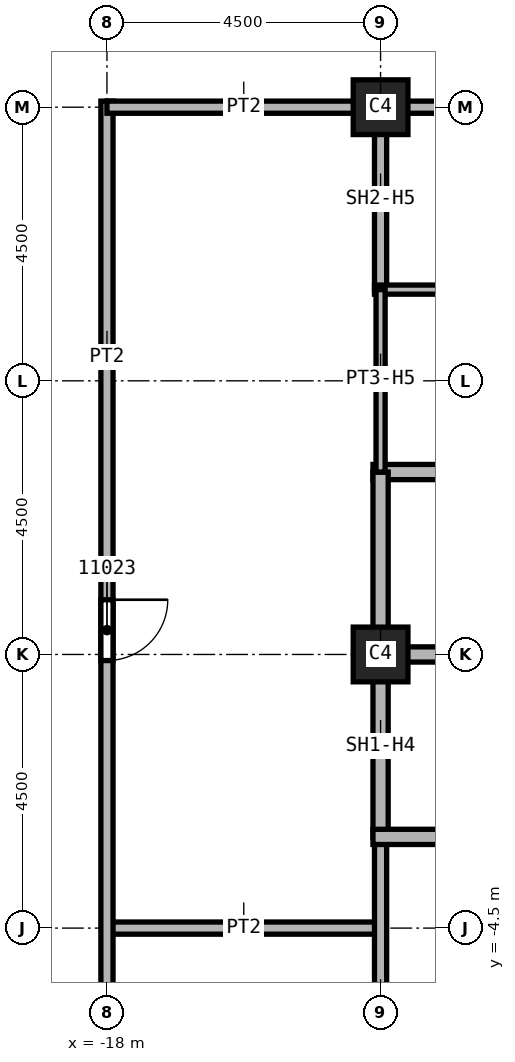
"""IFC4 building model, lengths in metres.
Left out: names, types, materials, properties, quantities, classifications, styles, units other than length and angle.
Written with IfcOpenShell. Run it as: python <this file> out.ifc"""

import sys

from ifc_helpers import new_model, si_unit, direction, frame, frame_2d, origin, origin_2d, place, context, subcontext, project, spatial, rectangle, extrude, element, fill, save


model = new_model("IFC4")
c1 = context("Model", 3, precision=1e-05, world=origin(), true_north=direction((0.0, 1.0)))
c2 = subcontext(c1, "Body", "Model", "MODEL_VIEW")
j1 = project(units=[si_unit("LENGTHUNIT", "METRE"), si_unit("PLANEANGLEUNIT", "RADIAN")], contexts=[c1])
p1 = place(None, origin())
s1 = spatial("IfcSite", under=j1, at=p1, CompositionType="ELEMENT")
p2 = place(p1, origin())
s2 = spatial("IfcBuilding", under=s1, at=p2, CompositionType="ELEMENT")
p3 = place(p2, frame((0.0, 0.0, 188.0)))
s3 = spatial("IfcBuildingStorey", under=s2, at=p3, CompositionType="ELEMENT", Elevation=188.0)
for number, where, z_axis, x_axis in (
    (1, (-13.5, 0.0, 0.0), (0.0, 0.0, 1.0), (1.0, 0.0, 0.0)),
    (2, (-13.5, 9.0, 0.0), (0.0, 0.0, 1.0), (1.0, 0.0, 0.0)),
):
    element("IfcColumn", number, at=place(p3, frame(where, z_axis=z_axis, x_axis=x_axis)), inside=s3, PredefinedType="COLUMN", context=c2, shape_type="SweptSolid", body=[
        extrude(rectangle(XDim=0.9, YDim=0.9, at=origin_2d()), origin(), (0.0, 0.0, 1.0), 3.72),
    ])
p4 = place(p3, frame((-18.0, -4.5, 0.0), z_axis=(0.0, 0.0, 1.0), x_axis=(1.0, 0.0, 0.0)))
e3 = element("IfcWall", 3, at=p4, inside=s3, PredefinedType="PARTITIONING", context=c2, shape_type="SweptSolid", body=[
    extrude(rectangle(XDim=4.5, YDim=0.2, at=frame_2d((2.25, 0.0))), origin(), (0.0, 0.0, 1.0), 3.72),
])
p5 = place(p3, frame((-18.0, 9.1, 0.0), z_axis=(0.0, 0.0, 1.0), x_axis=(0.0, -1.0, 0.0)))
e4 = element("IfcWall", 4, at=p5, inside=s3, PredefinedType="PARTITIONING", context=c2, shape_type="SweptSolid", body=[
    extrude(rectangle(XDim=18.2, YDim=0.2, at=frame_2d((9.1, 0.0))), origin(), (0.0, 0.0, 1.0), 3.72),
])
p6 = place(p5, frame((16.9, 0.0, 0.0)))
e5 = element("IfcOpeningElement", 5, at=p6, cuts=e4, PredefinedType="OPENING", context=c2, shape_type="SweptSolid", body=[
    extrude(rectangle(XDim=1.0, YDim=2.1, at=frame_2d((0.5, 1.05))), frame((0.0, 0.1, 0.0), z_axis=(0.0, -1.0, 0.0), x_axis=(1.0, 0.0, 0.0)), (0.0, 0.0, 1.0), 0.2),
])
p7 = place(p5, frame((8.2, 0.0, 0.0)))
e6 = element("IfcOpeningElement", 6, at=p7, cuts=e4, PredefinedType="OPENING", context=c2, shape_type="SweptSolid", body=[
    extrude(rectangle(XDim=1.0, YDim=2.1, at=frame_2d((0.5, 1.05))), frame((0.0, 0.1, 0.0), z_axis=(0.0, -1.0, 0.0), x_axis=(1.0, 0.0, 0.0)), (0.0, 0.0, 1.0), 0.2),
])
p8 = place(p3, frame((-13.5, 9.0, 0.0), z_axis=(0.0, 0.0, 1.0), x_axis=(-1.0, 0.0, 0.0)))
e7 = element("IfcWall", 7, at=p8, inside=s3, PredefinedType="PARTITIONING", context=c2, shape_type="SweptSolid", body=[
    extrude(rectangle(XDim=4.5, YDim=0.2, at=frame_2d((2.25, 0.0))), origin(), (0.0, 0.0, 1.0), 3.72),
])
p9 = place(p3, frame((-13.6, 9.0, 0.0), z_axis=(0.0, 0.0, 1.0), x_axis=(1.0, 0.0, 0.0)))
e8 = element("IfcWall", 8, at=p9, inside=s3, PredefinedType="SOLIDWALL", context=c2, shape_type="SweptSolid", body=[
    extrude(rectangle(XDim=3.1, YDim=0.2, at=frame_2d((1.55, 0.0))), origin(), (0.0, 0.0, 1.0), 2.958),
])
p10 = place(p3, frame((-13.5, -7.0, 0.0), z_axis=(0.0, 0.0, 1.0), x_axis=(0.0, 1.0, 0.0)))
e9 = element("IfcWall", 9, at=p10, inside=s3, PredefinedType="SOLIDWALL", context=c2, shape_type="SweptSolid", body=[
    extrude(rectangle(XDim=4.0, YDim=0.2, at=frame_2d((2.0, 0.0))), origin(), (0.0, 0.0, 1.0), 2.958),
])
p11 = place(p3, frame((-13.5, 6.0, 0.0), z_axis=(0.0, 0.0, 1.0), x_axis=(0.0, 1.0, 0.0)))
e10 = element("IfcWall", 10, at=p11, inside=s3, PredefinedType="SOLIDWALL", context=c2, shape_type="SweptSolid", body=[
    extrude(rectangle(XDim=3.1, YDim=0.2, at=frame_2d((1.55, 0.0))), origin(), (0.0, 0.0, 1.0), 2.958),
])
p12 = place(p3, frame((-13.625, 0.0, 0.0), z_axis=(0.0, 0.0, 1.0), x_axis=(1.0, 0.0, 0.0)))
e11 = element("IfcWall", 11, at=p12, inside=s3, PredefinedType="SOLIDWALL", context=c2, shape_type="SweptSolid", body=[
    extrude(rectangle(XDim=3.125, YDim=0.25, at=frame_2d((1.562, 0.0))), origin(), (0.0, 0.0, 1.0), 3.72),
])
p13 = place(p3, frame((-13.625, 3.0, 0.0), z_axis=(0.0, 0.0, 1.0), x_axis=(1.0, 0.0, 0.0)))
e12 = element("IfcWall", 12, at=p13, inside=s3, PredefinedType="SOLIDWALL", context=c2, shape_type="SweptSolid", body=[
    extrude(rectangle(XDim=9.25, YDim=0.25, at=frame_2d((4.625, 0.0))), origin(), (0.0, 0.0, 1.0), 3.72),
])
p14 = place(p13, frame((3.25, 0.0, 0.0)))
e13 = element("IfcOpeningElement", 13, at=p14, cuts=e12, PredefinedType="OPENING", context=c2, shape_type="SweptSolid", body=[
    extrude(rectangle(XDim=1.1, YDim=2.1, at=frame_2d((0.55, 1.05))), frame((0.0, 0.125, 0.0), z_axis=(0.0, -1.0, 0.0), x_axis=(1.0, 0.0, 0.0)), (0.0, 0.0, 1.0), 0.25),
])
p15 = place(p3, frame((-13.5, -3.0, 0.0), z_axis=(0.0, 0.0, 1.0), x_axis=(0.0, 1.0, 0.0)))
e14 = element("IfcWall", 14, at=p15, inside=s3, PredefinedType="SOLIDWALL", context=c2, shape_type="SweptSolid", body=[
    extrude(rectangle(XDim=6.0, YDim=0.25, at=frame_2d((3.0, 0.0))), origin(), (0.0, 0.0, 1.0), 2.958),
])
p16 = place(p3, frame((-13.625, -3.0, 0.0), z_axis=(0.0, 0.0, 1.0), x_axis=(1.0, 0.0, 0.0)))
e15 = element("IfcWall", 15, at=p16, inside=s3, PredefinedType="SOLIDWALL", context=c2, shape_type="SweptSolid", body=[
    extrude(rectangle(XDim=6.125, YDim=0.25, at=frame_2d((3.062, 0.0))), origin(), (0.0, 0.0, 1.0), 3.72),
])
p17 = place(p16, frame((3.25, 0.0, 0.0)))
e16 = element("IfcOpeningElement", 16, at=p17, cuts=e15, PredefinedType="OPENING", context=c2, shape_type="SweptSolid", body=[
    extrude(rectangle(XDim=1.1, YDim=2.1, at=frame_2d((0.55, 1.05))), frame((0.0, 0.125, 0.0), z_axis=(0.0, -1.0, 0.0), x_axis=(1.0, 0.0, 0.0)), (0.0, 0.0, 1.0), 0.25),
])
p18 = place(p3, frame((-13.6, 6.0, 0.0), z_axis=(0.0, 0.0, 1.0), x_axis=(1.0, 0.0, 0.0)))
e17 = element("IfcWall", 17, at=p18, inside=s3, PredefinedType="PARTITIONING", context=c2, shape_type="SweptSolid", body=[
    extrude(rectangle(XDim=3.1, YDim=0.15, at=frame_2d((1.55, 0.0))), origin(), (0.0, 0.0, 1.0), 3.72),
])
p19 = place(p3, frame((-13.5, 3.0, 0.0), z_axis=(0.0, 0.0, 1.0), x_axis=(0.0, 1.0, 0.0)))
e18 = element("IfcWall", 18, at=p19, inside=s3, PredefinedType="PARTITIONING", context=c2, shape_type="SweptSolid", body=[
    extrude(rectangle(XDim=3.0, YDim=0.15, at=frame_2d((1.5, 0.0))), origin(), (0.0, 0.0, 1.0), 2.958),
])
p20 = place(p7, origin())
e19 = element("IfcDoor", 19, at=p20, inside=s3, OperationType="SINGLE_SWING_RIGHT", PredefinedType="DOOR", context=c2, shape_type="SweptSolid", body=[
    extrude(rectangle(XDim=1.0, YDim=2.1, at=frame_2d((0.5, 1.05))), frame((0.0, 0.025, 0.0), z_axis=(0.0, -1.0, 0.0), x_axis=(1.0, 0.0, 0.0)), (0.0, 0.0, 1.0), 0.05),
])
fill(e6, e19)
save(model, sys.argv[1])
